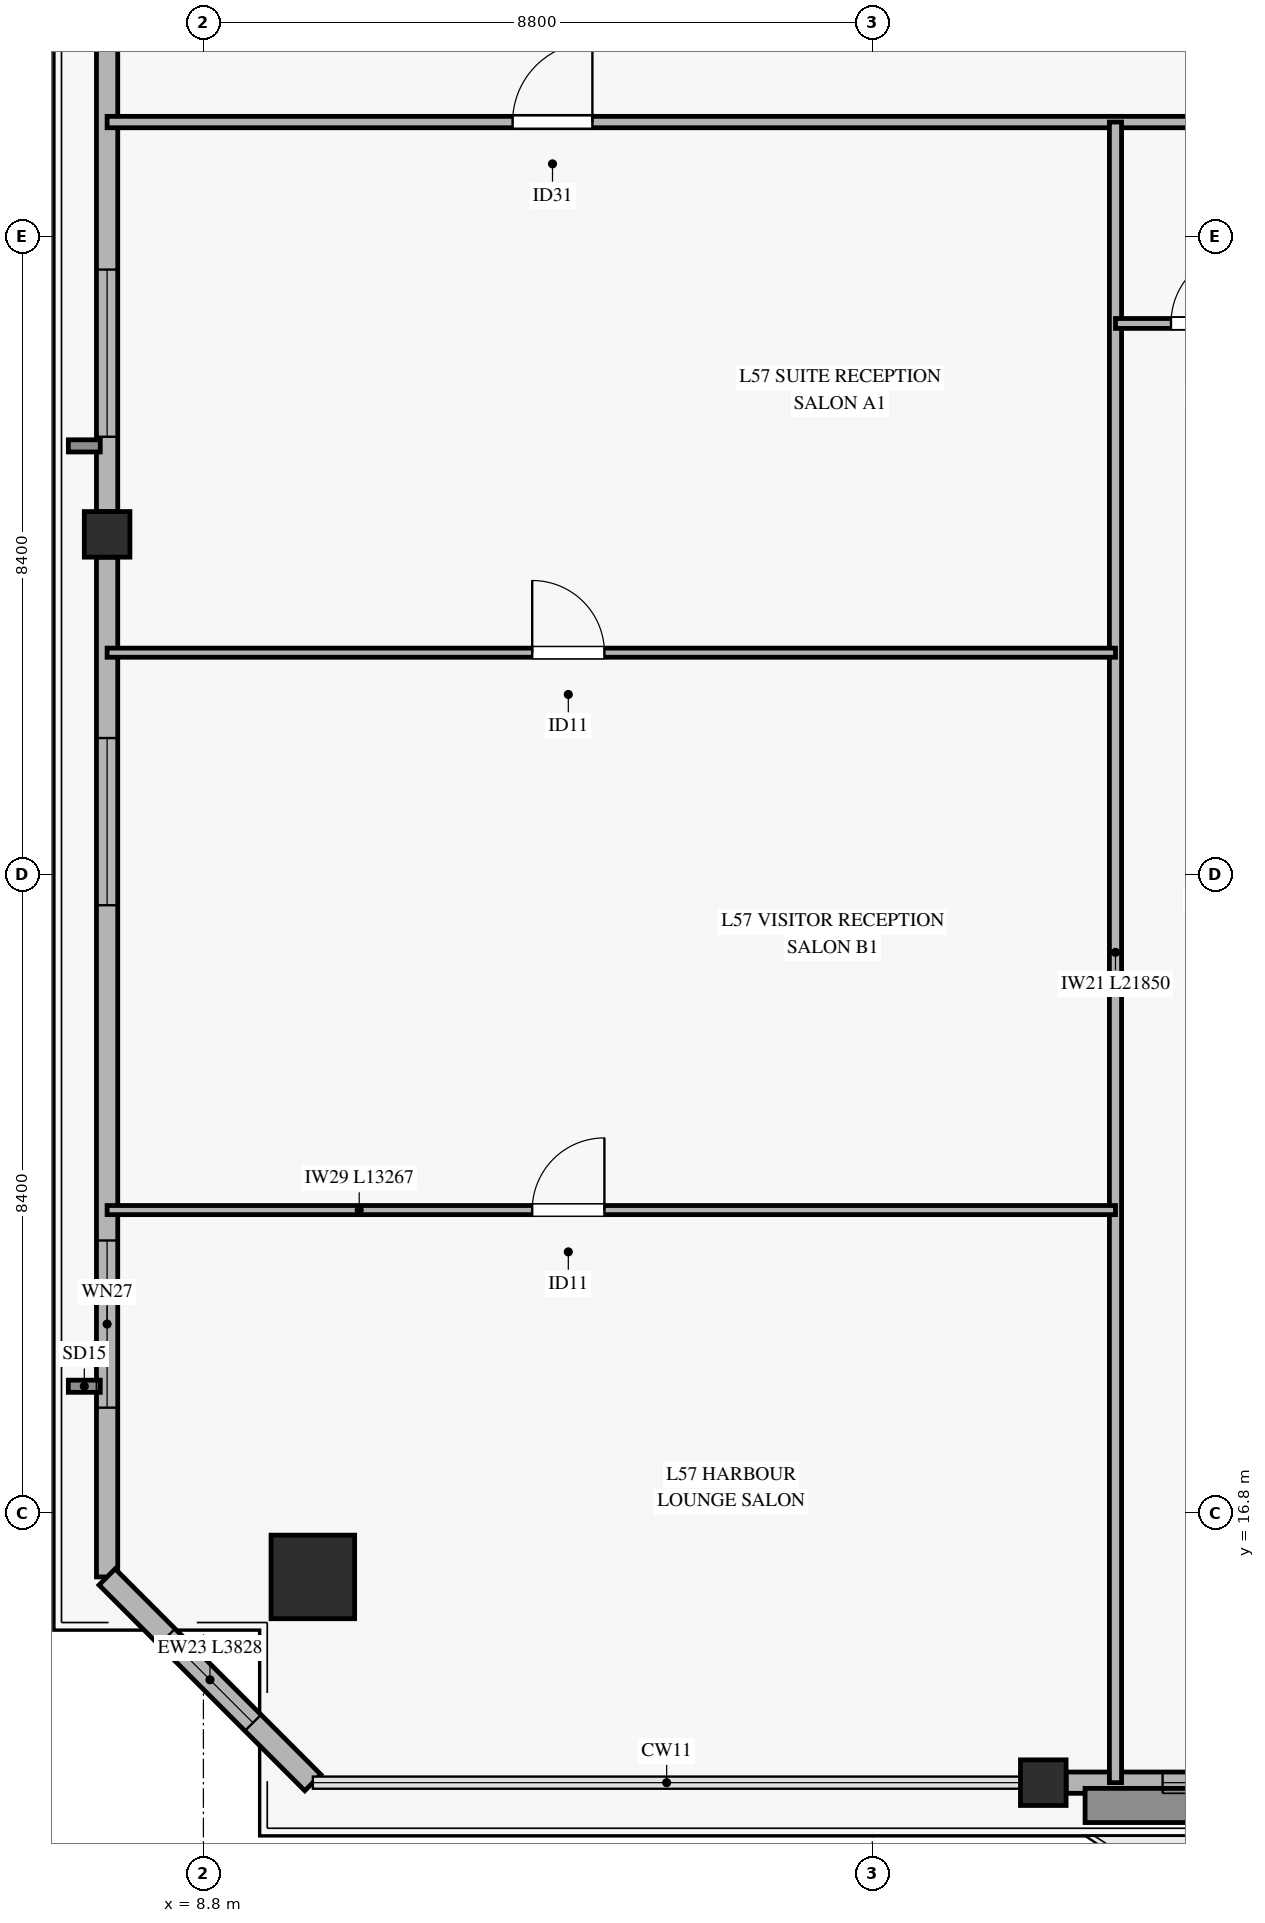
"""IFC4 building model, lengths in metres.
Left out: names, types, materials, properties, quantities, classifications, styles, units other than length and angle.
Written with IfcOpenShell. Run it as: python <this file> out.ifc"""

import sys

from ifc_helpers import new_model, si_unit, direction, frame, frame_2d, origin, origin_2d, place, context, subcontext, project, spatial, rectangle, hollow_rectangle, extrude, source, transform, mapped, element, fill, save


model = new_model("IFC4")
c1 = context("Model", 3, precision=1e-05, world=origin(), true_north=direction((0.0, 1.0)))
c2 = subcontext(c1, "Body", "Model", "MODEL_VIEW")
j1 = project(units=[si_unit("LENGTHUNIT", "METRE"), si_unit("PLANEANGLEUNIT", "RADIAN")], contexts=[c1])
p1 = place(None, origin())
s1 = spatial("IfcSite", under=j1, at=p1, CompositionType="ELEMENT")
p2 = place(p1, origin())
s2 = spatial("IfcBuilding", under=s1, at=p2, CompositionType="ELEMENT")
p3 = place(p2, frame((0.0, 0.0, 227.0)))
s3 = spatial("IfcBuildingStorey", under=s2, at=p3, CompositionType="ELEMENT", Elevation=227.0)
m1 = source(origin(), c2, "Body", "SweptSolid", [
    extrude(hollow_rectangle(XDim=1.1, YDim=1.1, WallThickness=0.05, at=origin_2d()), origin(), (0.0, 0.0, 1.0), 3.185),
])
p4 = place(p3, frame((10.24, 15.957, 0.0), z_axis=(0.0, 0.0, 1.0), x_axis=(1.0, 0.0, 0.0)))
e1 = element("IfcColumn", 1, at=p4, inside=s3, PredefinedType="COLUMN", context=c2, shape_type="MappedRepresentation", body=[
    mapped(m1, transform((0.0, 0.0, 0.0), x_axis=(1.0, 0.0, 0.0), y_axis=(0.0, 1.0, 0.0), z_axis=(0.0, 0.0, 1.0), scale=1.0)),
])
m2 = source(origin(), c2, "Body", "SweptSolid", [
    extrude(hollow_rectangle(XDim=0.6, YDim=0.6, WallThickness=0.028, at=origin_2d()), origin(), (0.0, 0.0, 1.0), 3.185),
])
for number, where, z_axis, x_axis in (
    (2, (19.85, 13.25, 0.0), (0.0, 0.0, 1.0), (1.0, 0.0, 0.0)),
    (3, (7.533, 29.675, 0.0), (0.0, 0.0, 1.0), (1.0, 0.0, 0.0)),
):
    element("IfcColumn", number, at=place(p3, frame(where, z_axis=z_axis, x_axis=x_axis)), inside=s3, PredefinedType="COLUMN", context=c2, shape_type="MappedRepresentation", body=[
        mapped(m2, transform((0.0, 0.0, 0.0), x_axis=(1.0, 0.0, 0.0), y_axis=(0.0, 1.0, 0.0), z_axis=(0.0, 0.0, 1.0), scale=1.0)),
    ])
p5 = place(p3, frame((20.15, 13.25, 0.0), z_axis=(0.0, 0.0, 1.0), x_axis=(1.0, 0.0, 0.0)))
e4 = element("IfcWall", 4, at=p5, inside=s3, PredefinedType="SOLIDWALL", context=c2, shape_type="SweptSolid", body=[
    extrude(rectangle(XDim=10.35, YDim=0.28, at=frame_2d((5.175, 0.0))), origin(), (0.0, 0.0, 1.0), 2.815),
])
p6 = place(p5, frame((4.25, 0.0, 0.0)))
e5 = element("IfcOpeningElement", 5, at=p6, cuts=e4, PredefinedType="OPENING", context=c2, shape_type="SweptSolid", body=[
    extrude(rectangle(XDim=1.8, YDim=2.25, at=frame_2d((0.9, 1.125))), frame((0.0, 0.15, 0.0), z_axis=(0.0, -1.0, 0.0), x_axis=(1.0, 0.0, 0.0)), (0.0, 0.0, 1.0), 0.3),
])
p7 = place(p5, frame((1.27, 0.0, 0.45)))
e6 = element("IfcOpeningElement", 6, at=p7, cuts=e4, PredefinedType="OPENING", context=c2, shape_type="SweptSolid", body=[
    extrude(rectangle(XDim=1.6, YDim=2.0, at=frame_2d((0.8, 1.0))), frame((0.0, 0.15, 0.0), z_axis=(0.0, -1.0, 0.0), x_axis=(1.0, 0.0, 0.0)), (0.0, 0.0, 1.0), 0.3),
])
p8 = place(p5, frame((7.35, 0.0, 0.45)))
e7 = element("IfcOpeningElement", 7, at=p8, cuts=e4, PredefinedType="OPENING", context=c2, shape_type="SweptSolid", body=[
    extrude(rectangle(XDim=1.6, YDim=2.0, at=frame_2d((0.8, 1.0))), frame((0.0, 0.15, 0.0), z_axis=(0.0, -1.0, 0.0), x_axis=(1.0, 0.0, 0.0)), (0.0, 0.0, 1.0), 0.3),
])
p9 = place(p3, frame((7.533, 15.957, 0.0), z_axis=(0.0, 0.0, 1.0), x_axis=(0.0, 1.0, 0.0)))
e8 = element("IfcWall", 8, at=p9, inside=s3, PredefinedType="SOLIDWALL", context=c2, shape_type="SweptSolid", body=[
    extrude(rectangle(XDim=13.418, YDim=0.28, at=frame_2d((6.709, 0.0))), origin(), (0.0, 0.0, 1.0), 2.815),
])
p10 = place(p9, frame((2.227, 0.0, 0.45)))
e9 = element("IfcOpeningElement", 9, at=p10, cuts=e8, PredefinedType="OPENING", context=c2, shape_type="SweptSolid", body=[
    extrude(rectangle(XDim=2.2, YDim=2.1, at=frame_2d((1.1, 1.05))), frame((0.0, 0.15, 0.0), z_axis=(0.0, -1.0, 0.0), x_axis=(1.0, 0.0, 0.0)), (0.0, 0.0, 1.0), 0.3),
])
p11 = place(p9, frame((8.838, 0.0, 0.45)))
e10 = element("IfcOpeningElement", 10, at=p11, cuts=e8, PredefinedType="OPENING", context=c2, shape_type="SweptSolid", body=[
    extrude(rectangle(XDim=2.2, YDim=2.1, at=frame_2d((1.1, 1.05))), frame((0.0, 0.15, 0.0), z_axis=(0.0, -1.0, 0.0), x_axis=(1.0, 0.0, 0.0)), (0.0, 0.0, 1.0), 0.3),
])
p12 = place(p3, frame((7.533, 29.975, 0.0), z_axis=(0.0, 0.0, 1.0), x_axis=(0.0, 1.0, 0.0)))
e11 = element("IfcWall", 11, at=p12, inside=s3, PredefinedType="SOLIDWALL", context=c2, shape_type="SweptSolid", body=[
    extrude(rectangle(XDim=13.418, YDim=0.28, at=frame_2d((6.709, 0.0))), origin(), (0.0, 0.0, 1.0), 2.815),
])
p13 = place(p12, frame((0.984, 0.0, 0.45)))
e12 = element("IfcOpeningElement", 12, at=p13, cuts=e11, PredefinedType="OPENING", context=c2, shape_type="SweptSolid", body=[
    extrude(rectangle(XDim=2.2, YDim=2.1, at=frame_2d((1.1, 1.05))), frame((0.0, 0.15, 0.0), z_axis=(0.0, -1.0, 0.0), x_axis=(1.0, 0.0, 0.0)), (0.0, 0.0, 1.0), 0.3),
])
p14 = place(p3, frame((7.533, 15.957, 0.0), z_axis=(0.0, 0.0, 1.0), x_axis=(0.707106781187, -0.707106781187, 0.0)))
e13 = element("IfcWall", 13, at=p14, inside=s3, PredefinedType="SOLIDWALL", context=c2, shape_type="SweptSolid", body=[
    extrude(rectangle(XDim=3.828, YDim=0.3, at=frame_2d((1.914, 0.0))), origin(), (0.0, 0.0, 1.0), 2.815),
])
p15 = place(p14, frame((1.114, 0.0, 0.45)))
e14 = element("IfcOpeningElement", 14, at=p15, cuts=e13, PredefinedType="OPENING", context=c2, shape_type="SweptSolid", body=[
    extrude(rectangle(XDim=1.6, YDim=2.0, at=frame_2d((0.8, 1.0))), frame((0.0, 0.16, 0.0), z_axis=(0.0, -1.0, 0.0), x_axis=(1.0, 0.0, 0.0)), (0.0, 0.0, 1.0), 0.32),
])
p16 = place(p3, frame((7.533, 35.1, 0.0), z_axis=(0.0, 0.0, 1.0), x_axis=(1.0, 0.0, 0.0)))
e15 = element("IfcWall", 15, at=p16, inside=s3, PredefinedType="PARTITIONING", context=c2, shape_type="SweptSolid", body=[
    extrude(rectangle(XDim=55.334, YDim=0.15, at=frame_2d((27.667, 0.0))), origin(), (0.0, 0.0, 1.0), 2.37),
])
p17 = place(p16, frame((5.335, 0.0, 0.0)))
e16 = element("IfcOpeningElement", 16, at=p17, cuts=e15, PredefinedType="OPENING", context=c2, shape_type="SweptSolid", body=[
    extrude(rectangle(XDim=1.05, YDim=2.15, at=frame_2d((0.525, 1.075))), frame((0.0, 0.085, 0.0), z_axis=(0.0, -1.0, 0.0), x_axis=(1.0, 0.0, 0.0)), (0.0, 0.0, 1.0), 0.17),
])
p18 = place(p16, frame((17.207, 0.0, 0.0)))
e17 = element("IfcOpeningElement", 17, at=p18, cuts=e15, PredefinedType="OPENING", context=c2, shape_type="SweptSolid", body=[
    extrude(rectangle(XDim=1.05, YDim=2.15, at=frame_2d((0.525, 1.075))), frame((0.0, 0.085, 0.0), z_axis=(0.0, -1.0, 0.0), x_axis=(1.0, 0.0, 0.0)), (0.0, 0.0, 1.0), 0.17),
])
p19 = place(p16, frame((25.884, 0.0, 0.0)))
e18 = element("IfcOpeningElement", 18, at=p19, cuts=e15, PredefinedType="OPENING", context=c2, shape_type="SweptSolid", body=[
    extrude(rectangle(XDim=1.05, YDim=2.15, at=frame_2d((0.525, 1.075))), frame((0.0, 0.085, 0.0), z_axis=(0.0, -1.0, 0.0), x_axis=(1.0, 0.0, 0.0)), (0.0, 0.0, 1.0), 0.17),
])
p20 = place(p16, frame((35.712, 0.0, 0.0)))
e19 = element("IfcOpeningElement", 19, at=p20, cuts=e15, PredefinedType="OPENING", context=c2, shape_type="SweptSolid", body=[
    extrude(rectangle(XDim=1.05, YDim=2.15, at=frame_2d((0.525, 1.075))), frame((0.0, 0.085, 0.0), z_axis=(0.0, -1.0, 0.0), x_axis=(1.0, 0.0, 0.0)), (0.0, 0.0, 1.0), 0.17),
])
p21 = place(p16, frame((47.078, 0.0, 0.0)))
e20 = element("IfcOpeningElement", 20, at=p21, cuts=e15, PredefinedType="OPENING", context=c2, shape_type="SweptSolid", body=[
    extrude(rectangle(XDim=1.05, YDim=2.15, at=frame_2d((0.525, 1.075))), frame((0.0, 0.085, 0.0), z_axis=(0.0, -1.0, 0.0), x_axis=(1.0, 0.0, 0.0)), (0.0, 0.0, 1.0), 0.17),
])
p22 = place(p3, frame((20.8, 13.25, 0.0), z_axis=(0.0, 0.0, 1.0), x_axis=(0.0, 1.0, 0.0)))
e21 = element("IfcWall", 21, at=p22, inside=s3, PredefinedType="PARTITIONING", context=c2, shape_type="SweptSolid", body=[
    extrude(rectangle(XDim=21.85, YDim=0.16, at=frame_2d((10.925, 0.0))), origin(), (0.0, 0.0, 1.0), 2.77),
])
p23 = place(p3, frame((7.533, 20.784, 0.0), z_axis=(0.0, 0.0, 1.0), x_axis=(1.0, 0.0, 0.0)))
e22 = element("IfcWall", 22, at=p23, inside=s3, PredefinedType="PARTITIONING", context=c2, shape_type="SweptSolid", body=[
    extrude(rectangle(XDim=13.267, YDim=0.12, at=frame_2d((6.634, 0.0))), origin(), (0.0, 0.0, 1.0), 2.37),
])
p24 = place(p23, frame((5.593, 0.0, 0.0)))
e23 = element("IfcOpeningElement", 23, at=p24, cuts=e22, PredefinedType="OPENING", context=c2, shape_type="SweptSolid", body=[
    extrude(rectangle(XDim=0.95, YDim=2.1, at=frame_2d((0.475, 1.05))), frame((0.0, 0.07, 0.0), z_axis=(0.0, -1.0, 0.0), x_axis=(1.0, 0.0, 0.0)), (0.0, 0.0, 1.0), 0.14),
])
p25 = place(p3, frame((7.533, 28.118, 0.0), z_axis=(0.0, 0.0, 1.0), x_axis=(1.0, 0.0, 0.0)))
e24 = element("IfcWall", 24, at=p25, inside=s3, PredefinedType="PARTITIONING", context=c2, shape_type="SweptSolid", body=[
    extrude(rectangle(XDim=13.267, YDim=0.12, at=frame_2d((6.634, 0.0))), origin(), (0.0, 0.0, 1.0), 2.37),
])
p26 = place(p25, frame((5.593, 0.0, 0.0)))
e25 = element("IfcOpeningElement", 25, at=p26, cuts=e24, PredefinedType="OPENING", context=c2, shape_type="SweptSolid", body=[
    extrude(rectangle(XDim=0.95, YDim=2.1, at=frame_2d((0.475, 1.05))), frame((0.0, 0.07, 0.0), z_axis=(0.0, -1.0, 0.0), x_axis=(1.0, 0.0, 0.0)), (0.0, 0.0, 1.0), 0.14),
])
p27 = place(p3, frame((20.8, 32.45, 0.0), z_axis=(0.0, 0.0, 1.0), x_axis=(1.0, 0.0, 0.0)))
e26 = element("IfcWall", 26, at=p27, inside=s3, PredefinedType="PARTITIONING", context=c2, shape_type="SweptSolid", body=[
    extrude(rectangle(XDim=2.17, YDim=0.13, at=frame_2d((1.085, 0.0))), origin(), (0.0, 0.0, 1.0), 2.77),
])
p28 = place(p27, frame((0.73, 0.0, 0.0)))
e27 = element("IfcOpeningElement", 27, at=p28, cuts=e26, PredefinedType="OPENING", context=c2, shape_type="SweptSolid", body=[
    extrude(rectangle(XDim=0.95, YDim=2.1, at=frame_2d((0.475, 1.05))), frame((0.0, 0.075, 0.0), z_axis=(0.0, -1.0, 0.0), x_axis=(1.0, 0.0, 0.0)), (0.0, 0.0, 1.0), 0.15),
])
m3 = source(origin(), c2, "Body", "SweptSolid", [
    extrude(rectangle(XDim=1.6, YDim=2.0, at=frame_2d((0.8, 1.0))), frame((0.0, 0.03, 0.0), z_axis=(0.0, -1.0, 0.0), x_axis=(1.0, 0.0, 0.0)), (0.0, 0.0, 1.0), 0.06),
])
p29 = place(p7, origin())
e28 = element("IfcWindow", 28, at=p29, inside=s3, PartitioningType="SINGLE_PANEL", PredefinedType="WINDOW", context=c2, shape_type="MappedRepresentation", body=[
    mapped(m3, transform((0.0, 0.0, 0.0), x_axis=(1.0, 0.0, 0.0), y_axis=(0.0, 1.0, 0.0), z_axis=(0.0, 0.0, 1.0), scale=1.0)),
])
fill(e6, e28)
m4 = source(origin(), c2, "Body", "SweptSolid", [
    extrude(rectangle(XDim=2.2, YDim=2.1, at=frame_2d((1.1, 1.05))), frame((0.0, 0.03, 0.0), z_axis=(0.0, -1.0, 0.0), x_axis=(1.0, 0.0, 0.0)), (0.0, 0.0, 1.0), 0.06),
])
p30 = place(p10, origin())
e29 = element("IfcWindow", 29, at=p30, inside=s3, PartitioningType="SINGLE_PANEL", PredefinedType="WINDOW", context=c2, shape_type="MappedRepresentation", body=[
    mapped(m4, transform((0.0, 0.0, 0.0), x_axis=(1.0, 0.0, 0.0), y_axis=(0.0, 1.0, 0.0), z_axis=(0.0, 0.0, 1.0), scale=1.0)),
])
fill(e9, e29)
p31 = place(p11, origin())
e30 = element("IfcWindow", 30, at=p31, inside=s3, PartitioningType="SINGLE_PANEL", PredefinedType="WINDOW", context=c2, shape_type="MappedRepresentation", body=[
    mapped(m4, transform((0.0, 0.0, 0.0), x_axis=(1.0, 0.0, 0.0), y_axis=(0.0, 1.0, 0.0), z_axis=(0.0, 0.0, 1.0), scale=1.0)),
])
fill(e10, e30)
p32 = place(p13, origin())
e31 = element("IfcWindow", 31, at=p32, inside=s3, PartitioningType="SINGLE_PANEL", PredefinedType="WINDOW", context=c2, shape_type="MappedRepresentation", body=[
    mapped(m4, transform((0.0, 0.0, 0.0), x_axis=(1.0, 0.0, 0.0), y_axis=(0.0, 1.0, 0.0), z_axis=(0.0, 0.0, 1.0), scale=1.0)),
])
fill(e12, e31)
p33 = place(p15, origin())
e32 = element("IfcWindow", 32, at=p33, inside=s3, PartitioningType="SINGLE_PANEL", PredefinedType="WINDOW", context=c2, shape_type="MappedRepresentation", body=[
    mapped(m3, transform((0.0, 0.0, 0.0), x_axis=(1.0, 0.0, 0.0), y_axis=(0.0, 1.0, 0.0), z_axis=(0.0, 0.0, 1.0), scale=1.0)),
])
fill(e14, e32)
m5 = source(origin(), c2, "Body", "SweptSolid", [
    extrude(rectangle(XDim=1.05, YDim=2.15, at=frame_2d((0.525, 1.075))), frame((0.0, 0.025, 0.0), z_axis=(0.0, -1.0, 0.0), x_axis=(1.0, 0.0, 0.0)), (0.0, 0.0, 1.0), 0.05),
])
p34 = place(p17, origin())
e33 = element("IfcDoor", 33, at=p34, inside=s3, OperationType="SINGLE_SWING_RIGHT", PredefinedType="DOOR", context=c2, shape_type="MappedRepresentation", body=[
    mapped(m5, transform((0.0, 0.0, 0.0), x_axis=(1.0, 0.0, 0.0), y_axis=(0.0, 1.0, 0.0), z_axis=(0.0, 0.0, 1.0), scale=1.0)),
])
fill(e16, e33)
m6 = source(origin(), c2, "Body", "SweptSolid", [
    extrude(rectangle(XDim=0.95, YDim=2.1, at=frame_2d((0.475, 1.05))), frame((0.0, 0.025, 0.0), z_axis=(0.0, -1.0, 0.0), x_axis=(1.0, 0.0, 0.0)), (0.0, 0.0, 1.0), 0.05),
])
p35 = place(p26, origin())
e34 = element("IfcDoor", 34, at=p35, inside=s3, OperationType="SINGLE_SWING_LEFT", PredefinedType="DOOR", context=c2, shape_type="MappedRepresentation", body=[
    mapped(m6, transform((0.0, 0.0, 0.0), x_axis=(1.0, 0.0, 0.0), y_axis=(0.0, 1.0, 0.0), z_axis=(0.0, 0.0, 1.0), scale=1.0)),
])
fill(e25, e34)
p36 = place(p24, origin())
e35 = element("IfcDoor", 35, at=p36, inside=s3, OperationType="SINGLE_SWING_RIGHT", PredefinedType="DOOR", context=c2, shape_type="MappedRepresentation", body=[
    mapped(m6, transform((0.0, 0.0, 0.0), x_axis=(1.0, 0.0, 0.0), y_axis=(0.0, 1.0, 0.0), z_axis=(0.0, 0.0, 1.0), scale=1.0)),
])
fill(e23, e35)
p37 = place(p28, origin())
e36 = element("IfcDoor", 36, at=p37, inside=s3, OperationType="SINGLE_SWING_RIGHT", PredefinedType="DOOR", context=c2, shape_type="MappedRepresentation", body=[
    mapped(m6, transform((0.0, 0.0, 0.0), x_axis=(1.0, 0.0, 0.0), y_axis=(0.0, 1.0, 0.0), z_axis=(0.0, 0.0, 1.0), scale=1.0)),
])
fill(e27, e36)
save(model, sys.argv[1])
